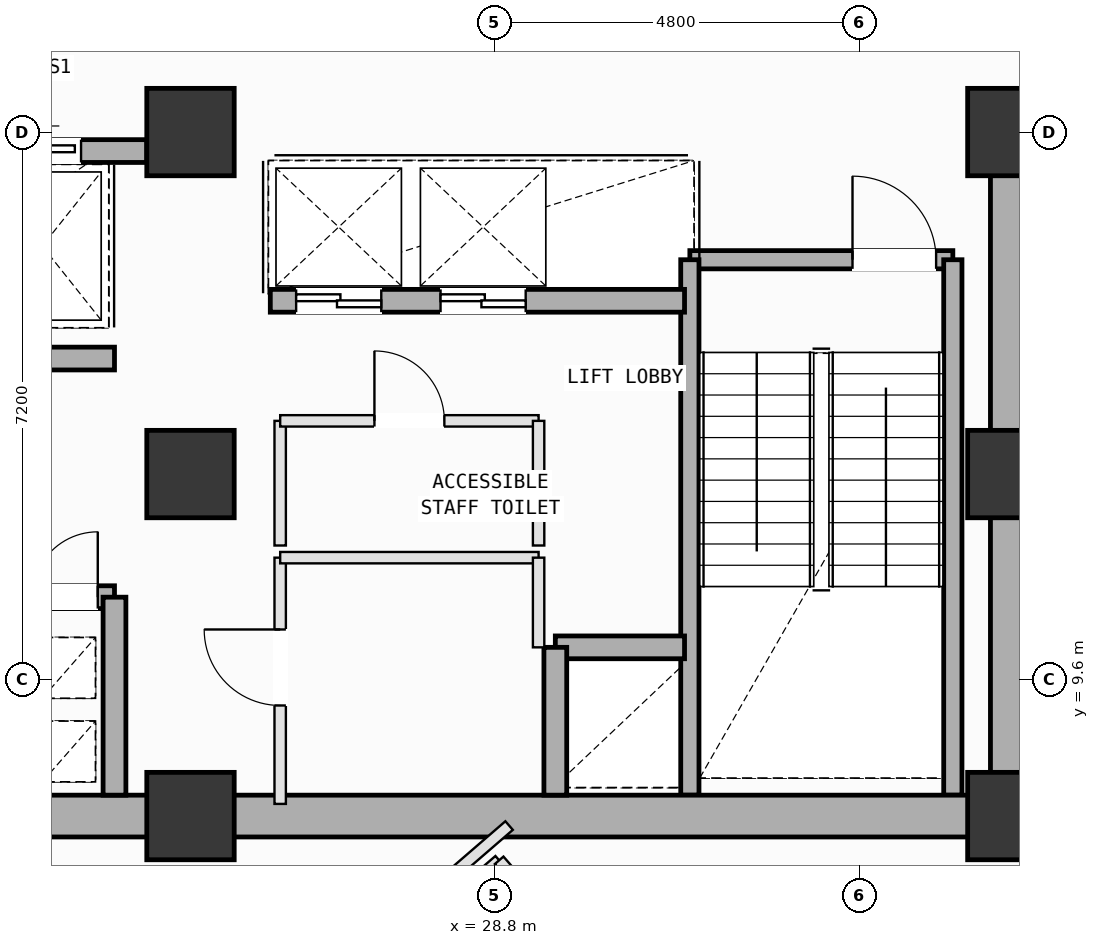
"""IFC4 building model, lengths in metres.
Left out: names, types, materials, properties, quantities, classifications, styles, units other than length and angle.
Written with IfcOpenShell. Run it as: python <this file> out.ifc"""

import sys

from ifc_helpers import new_model, si_unit, direction, frame, frame_2d, origin, origin_2d, place, context, subcontext, project, spatial, rectangle, extrude, element, fill, save


model = new_model("IFC4")
c1 = context("Model", 3, precision=1e-05, world=origin(), true_north=direction((0.0, 1.0)))
c2 = subcontext(c1, "Body", "Model", "MODEL_VIEW")
j1 = project(units=[si_unit("LENGTHUNIT", "METRE"), si_unit("PLANEANGLEUNIT", "RADIAN")], contexts=[c1])
p1 = place(None, origin())
s1 = spatial("IfcSite", under=j1, at=p1, CompositionType="ELEMENT")
p2 = place(p1, origin())
s2 = spatial("IfcBuilding", under=s1, at=p2, CompositionType="ELEMENT")
p3 = place(p2, frame((0.0, 0.0, 197.8)))
s3 = spatial("IfcBuildingStorey", under=s2, at=p3, CompositionType="ELEMENT", Elevation=197.8)
for number, where, z_axis, x_axis in (
    (1, (24.8, 7.8, 0.0), (0.0, 0.0, 1.0), (1.0, 0.0, 0.0)),
    (2, (24.8, 12.3, 0.0), (0.0, 0.0, 1.0), (1.0, 0.0, 0.0)),
    (3, (24.8, 16.8, 0.0), (0.0, 0.0, 1.0), (1.0, 0.0, 0.0)),
    (4, (35.6, 7.8, 0.0), (0.0, 0.0, 1.0), (1.0, 0.0, 0.0)),
    (5, (35.6, 12.3, 0.0), (0.0, 0.0, 1.0), (1.0, 0.0, 0.0)),
    (6, (35.6, 16.8, 0.0), (0.0, 0.0, 1.0), (1.0, 0.0, 0.0)),
):
    element("IfcColumn", number, at=place(p3, frame(where, z_axis=z_axis, x_axis=x_axis)), inside=s3, PredefinedType="COLUMN", context=c2, shape_type="SweptSolid", body=[
        extrude(rectangle(XDim=1.15, YDim=1.15, at=origin_2d()), origin(), (0.0, 0.0, 1.0), 4.0),
    ])
p4 = place(p3, frame((31.37, 15.12, 0.0), z_axis=(0.0, 0.0, 1.0), x_axis=(1.0, 0.0, 0.0)))
e7 = element("IfcWall", 7, at=p4, inside=s3, PredefinedType="SOLIDWALL", context=c2, shape_type="SweptSolid", body=[
    extrude(rectangle(XDim=3.46, YDim=0.24, at=frame_2d((1.73, 0.0))), origin(), (0.0, 0.0, 1.0), 3.78),
])
p5 = place(p4, frame((2.14, 0.0, 0.0)))
e8 = element("IfcOpeningElement", 8, at=p5, cuts=e7, PredefinedType="OPENING", context=c2, shape_type="SweptSolid", body=[
    extrude(rectangle(XDim=1.1, YDim=2.15, at=frame_2d((0.55, 1.075))), frame((0.0, 0.13, 0.0), z_axis=(0.0, -1.0, 0.0), x_axis=(1.0, 0.0, 0.0)), (0.0, 0.0, 1.0), 0.26),
])
for number, where, z_axis, x_axis in (
    (9, (34.83, 15.12, 0.0), (0.0, 0.0, 1.0), (0.0, -1.0, 0.0)),
    (10, (31.37, 8.075, 0.0), (0.0, 0.0, 1.0), (0.0, 1.0, 0.0)),
):
    element("IfcWall", number, at=place(p3, frame(where, z_axis=z_axis, x_axis=x_axis)), inside=s3, PredefinedType="SOLIDWALL", context=c2, shape_type="SweptSolid", body=[
        extrude(rectangle(XDim=7.045, YDim=0.24, at=frame_2d((3.522, 0.0))), origin(), (0.0, 0.0, 1.0), 3.78),
    ])
for number, where, z_axis, x_axis in (
    (11, (14.0, 7.8, 0.0), (0.0, 0.0, 1.0), (1.0, 0.0, 0.0)),
    (12, (24.8, 7.8, 0.0), (0.0, 0.0, 1.0), (1.0, 0.0, 0.0)),
):
    element("IfcWall", number, at=place(p3, frame(where, z_axis=z_axis, x_axis=x_axis)), inside=s3, PredefinedType="SHEAR", context=c2, shape_type="SweptSolid", body=[
        extrude(rectangle(XDim=10.8, YDim=0.55, at=frame_2d((5.4, 0.0))), origin(), (0.0, 0.0, 1.0), 3.78),
    ])
p6 = place(p3, frame((35.6, 7.8, 0.0), z_axis=(0.0, 0.0, 1.0), x_axis=(0.0, 1.0, 0.0)))
e13 = element("IfcWall", 13, at=p6, inside=s3, PredefinedType="SHEAR", context=c2, shape_type="SweptSolid", body=[
    extrude(rectangle(XDim=9.0, YDim=0.55, at=frame_2d((4.5, 0.0))), origin(), (0.0, 0.0, 1.0), 3.78),
])
p7 = place(p3, frame((19.85, 16.55, 0.0), z_axis=(0.0, 0.0, 1.0), x_axis=(1.0, 0.0, 0.0)))
e14 = element("IfcWall", 14, at=p7, inside=s3, PredefinedType="SOLIDWALL", context=c2, shape_type="SweptSolid", body=[
    extrude(rectangle(XDim=4.375, YDim=0.3, at=frame_2d((2.188, 0.0))), origin(), (0.0, 0.0, 1.0), 3.78),
])
p8 = place(p7, frame((0.475, 0.0, 0.0)))
e15 = element("IfcOpeningElement", 15, at=p8, cuts=e14, PredefinedType="OPENING", context=c2, shape_type="SweptSolid", body=[
    extrude(rectangle(XDim=1.25, YDim=2.18, at=frame_2d((0.625, 1.09))), frame((0.0, 0.16, 0.0), z_axis=(0.0, -1.0, 0.0), x_axis=(1.0, 0.0, 0.0)), (0.0, 0.0, 1.0), 0.32),
])
p9 = place(p7, frame((2.49, 0.0, 0.0)))
e16 = element("IfcOpeningElement", 16, at=p9, cuts=e14, PredefinedType="OPENING", context=c2, shape_type="SweptSolid", body=[
    extrude(rectangle(XDim=1.02, YDim=2.12, at=frame_2d((0.51, 1.06))), frame((0.0, 0.16, 0.0), z_axis=(0.0, -1.0, 0.0), x_axis=(1.0, 0.0, 0.0)), (0.0, 0.0, 1.0), 0.32),
])
p10 = place(p3, frame((18.5, 10.68, 0.0), z_axis=(0.0, 0.0, 1.0), x_axis=(1.0, 0.0, 0.0)))
e17 = element("IfcWall", 17, at=p10, inside=s3, PredefinedType="SOLIDWALL", context=c2, shape_type="SweptSolid", body=[
    extrude(rectangle(XDim=5.3, YDim=0.3, at=frame_2d((2.65, 0.0))), origin(), (0.0, 0.0, 1.0), 3.78),
])
p11 = place(p10, frame((4.22, 0.0, 0.0)))
e18 = element("IfcOpeningElement", 18, at=p11, cuts=e17, PredefinedType="OPENING", context=c2, shape_type="SweptSolid", body=[
    extrude(rectangle(XDim=0.86, YDim=2.06, at=frame_2d((0.43, 1.03))), frame((0.0, 0.16, 0.0), z_axis=(0.0, -1.0, 0.0), x_axis=(1.0, 0.0, 0.0)), (0.0, 0.0, 1.0), 0.32),
])
p12 = place(p10, frame((0.425, 0.0, 0.0)))
e19 = element("IfcOpeningElement", 19, at=p12, cuts=e17, PredefinedType="OPENING", context=c2, shape_type="SweptSolid", body=[
    extrude(rectangle(XDim=1.25, YDim=2.18, at=frame_2d((0.625, 1.09))), frame((0.0, 0.16, 0.0), z_axis=(0.0, -1.0, 0.0), x_axis=(1.0, 0.0, 0.0)), (0.0, 0.0, 1.0), 0.32),
])
p13 = place(p10, frame((2.525, 0.0, 0.0)))
e20 = element("IfcOpeningElement", 20, at=p13, cuts=e17, PredefinedType="OPENING", context=c2, shape_type="SweptSolid", body=[
    extrude(rectangle(XDim=1.25, YDim=2.18, at=frame_2d((0.625, 1.09))), frame((0.0, 0.16, 0.0), z_axis=(0.0, -1.0, 0.0), x_axis=(1.0, 0.0, 0.0)), (0.0, 0.0, 1.0), 0.32),
])
p14 = place(p3, frame((18.5, 13.82, 0.0), z_axis=(0.0, 0.0, 1.0), x_axis=(1.0, 0.0, 0.0)))
e21 = element("IfcWall", 21, at=p14, inside=s3, PredefinedType="SOLIDWALL", context=c2, shape_type="SweptSolid", body=[
    extrude(rectangle(XDim=5.3, YDim=0.3, at=frame_2d((2.65, 0.0))), origin(), (0.0, 0.0, 1.0), 3.78),
])
p15 = place(p14, frame((0.18, 0.0, 0.0)))
e22 = element("IfcOpeningElement", 22, at=p15, cuts=e21, PredefinedType="OPENING", context=c2, shape_type="SweptSolid", body=[
    extrude(rectangle(XDim=1.1, YDim=2.15, at=frame_2d((0.55, 1.075))), frame((0.0, 0.16, 0.0), z_axis=(0.0, -1.0, 0.0), x_axis=(1.0, 0.0, 0.0)), (0.0, 0.0, 1.0), 0.32),
])
p16 = place(p3, frame((23.8, 8.075, 0.0), z_axis=(0.0, 0.0, 1.0), x_axis=(0.0, 1.0, 0.0)))
e23 = element("IfcWall", 23, at=p16, inside=s3, PredefinedType="SOLIDWALL", context=c2, shape_type="SweptSolid", body=[
    extrude(rectangle(XDim=2.605, YDim=0.3, at=frame_2d((1.302, 0.0))), origin(), (0.0, 0.0, 1.0), 3.78),
])
p17 = place(p3, frame((29.6, 10.02, 0.0), z_axis=(0.0, 0.0, 1.0), x_axis=(1.0, 0.0, 0.0)))
e24 = element("IfcWall", 24, at=p17, inside=s3, PredefinedType="SOLIDWALL", context=c2, shape_type="SweptSolid", body=[
    extrude(rectangle(XDim=1.7, YDim=0.3, at=frame_2d((0.85, 0.0))), origin(), (0.0, 0.0, 1.0), 3.78),
])
p18 = place(p3, frame((29.6, 8.075, 0.0), z_axis=(0.0, 0.0, 1.0), x_axis=(0.0, 1.0, 0.0)))
e25 = element("IfcWall", 25, at=p18, inside=s3, PredefinedType="SOLIDWALL", context=c2, shape_type="SweptSolid", body=[
    extrude(rectangle(XDim=1.945, YDim=0.3, at=frame_2d((0.973, 0.0))), origin(), (0.0, 0.0, 1.0), 3.78),
])
p19 = place(p3, frame((25.85, 14.58, 0.0), z_axis=(0.0, 0.0, 1.0), x_axis=(1.0, 0.0, 0.0)))
e26 = element("IfcWall", 26, at=p19, inside=s3, PredefinedType="SOLIDWALL", context=c2, shape_type="SweptSolid", body=[
    extrude(rectangle(XDim=5.45, YDim=0.3, at=frame_2d((2.725, 0.0))), origin(), (0.0, 0.0, 1.0), 3.78),
])
p20 = place(p19, frame((0.34, 0.0, 0.0)))
e27 = element("IfcOpeningElement", 27, at=p20, cuts=e26, PredefinedType="OPENING", context=c2, shape_type="SweptSolid", body=[
    extrude(rectangle(XDim=1.12, YDim=2.15, at=frame_2d((0.56, 1.075))), frame((0.0, 0.16, 0.0), z_axis=(0.0, -1.0, 0.0), x_axis=(1.0, 0.0, 0.0)), (0.0, 0.0, 1.0), 0.32),
])
p21 = place(p19, frame((2.24, 0.0, 0.0)))
e28 = element("IfcOpeningElement", 28, at=p21, cuts=e26, PredefinedType="OPENING", context=c2, shape_type="SweptSolid", body=[
    extrude(rectangle(XDim=1.12, YDim=2.15, at=frame_2d((0.56, 1.075))), frame((0.0, 0.16, 0.0), z_axis=(0.0, -1.0, 0.0), x_axis=(1.0, 0.0, 0.0)), (0.0, 0.0, 1.0), 0.32),
])
p22 = place(p3, frame((25.98, 7.96, 0.0), z_axis=(0.0, 0.0, 1.0), x_axis=(0.0, 1.0, 0.0)))
e29 = element("IfcWall", 29, at=p22, inside=s3, PredefinedType="PARTITIONING", context=c2, shape_type="SweptSolid", body=[
    extrude(rectangle(XDim=3.24, YDim=0.15, at=frame_2d((1.62, 0.0))), origin(), (0.0, 0.0, 1.0), 3.78),
])
p23 = place(p22, frame((1.295, 0.0, 0.0)))
e30 = element("IfcOpeningElement", 30, at=p23, cuts=e29, PredefinedType="OPENING", context=c2, shape_type="SweptSolid", body=[
    extrude(rectangle(XDim=1.0, YDim=2.12, at=frame_2d((0.5, 1.06))), frame((0.0, 0.085, 0.0), z_axis=(0.0, -1.0, 0.0), x_axis=(1.0, 0.0, 0.0)), (0.0, 0.0, 1.0), 0.17),
])
p24 = place(p3, frame((25.98, 11.2, 0.0), z_axis=(0.0, 0.0, 1.0), x_axis=(1.0, 0.0, 0.0)))
e31 = element("IfcWall", 31, at=p24, inside=s3, PredefinedType="PARTITIONING", context=c2, shape_type="SweptSolid", body=[
    extrude(rectangle(XDim=3.4, YDim=0.15, at=frame_2d((1.7, 0.0))), origin(), (0.0, 0.0, 1.0), 3.78),
])
p25 = place(p3, frame((29.38, 11.2, 0.0), z_axis=(0.0, 0.0, 1.0), x_axis=(0.0, -1.0, 0.0)))
e32 = element("IfcWall", 32, at=p25, inside=s3, PredefinedType="PARTITIONING", context=c2, shape_type="SweptSolid", body=[
    extrude(rectangle(XDim=1.18, YDim=0.15, at=frame_2d((0.59, 0.0))), origin(), (0.0, 0.0, 1.0), 3.78),
])
p26 = place(p3, frame((25.98, 11.36, 0.0), z_axis=(0.0, 0.0, 1.0), x_axis=(0.0, 1.0, 0.0)))
e33 = element("IfcWall", 33, at=p26, inside=s3, PredefinedType="PARTITIONING", context=c2, shape_type="SweptSolid", body=[
    extrude(rectangle(XDim=1.64, YDim=0.15, at=frame_2d((0.82, 0.0))), origin(), (0.0, 0.0, 1.0), 3.78),
])
p27 = place(p3, frame((25.98, 13.0, 0.0), z_axis=(0.0, 0.0, 1.0), x_axis=(1.0, 0.0, 0.0)))
e34 = element("IfcWall", 34, at=p27, inside=s3, PredefinedType="PARTITIONING", context=c2, shape_type="SweptSolid", body=[
    extrude(rectangle(XDim=3.4, YDim=0.15, at=frame_2d((1.7, 0.0))), origin(), (0.0, 0.0, 1.0), 3.78),
])
p28 = place(p27, frame((1.24, 0.0, 0.0)))
e35 = element("IfcOpeningElement", 35, at=p28, cuts=e34, PredefinedType="OPENING", context=c2, shape_type="SweptSolid", body=[
    extrude(rectangle(XDim=0.92, YDim=2.1, at=frame_2d((0.46, 1.05))), frame((0.0, 0.085, 0.0), z_axis=(0.0, -1.0, 0.0), x_axis=(1.0, 0.0, 0.0)), (0.0, 0.0, 1.0), 0.17),
])
p29 = place(p3, frame((29.38, 13.0, 0.0), z_axis=(0.0, 0.0, 1.0), x_axis=(0.0, -1.0, 0.0)))
e36 = element("IfcWall", 36, at=p29, inside=s3, PredefinedType="PARTITIONING", context=c2, shape_type="SweptSolid", body=[
    extrude(rectangle(XDim=1.64, YDim=0.15, at=frame_2d((0.82, 0.0))), origin(), (0.0, 0.0, 1.0), 3.78),
])
p30 = place(p3, frame((19.602, -0.788, 0.0), z_axis=(0.0, 0.0, 1.0), x_axis=(0.756432248101, 0.654072055688, 0.0)))
e37 = element("IfcWall", 37, at=p30, inside=s3, PredefinedType="PARTITIONING", context=c2, shape_type="SweptSolid", body=[
    extrude(rectangle(XDim=12.24, YDim=0.15, at=frame_2d((6.12, 0.0))), origin(), (0.0, 0.0, 1.0), 3.78),
])
p31 = place(p3, frame((28.861, 7.218, 0.0), z_axis=(0.0, 0.0, 1.0), x_axis=(0.654048499955, -0.756452615639, 0.0)))
e38 = element("IfcWall", 38, at=p31, inside=s3, PredefinedType="PARTITIONING", context=c2, shape_type="SweptSolid", body=[
    extrude(rectangle(XDim=11.935, YDim=0.15, at=frame_2d((5.967, 0.0))), origin(), (0.0, 0.0, 1.0), 3.78),
])
p32 = place(p31, frame((5.537, 0.0, 0.0)))
e39 = element("IfcOpeningElement", 39, at=p32, cuts=e38, PredefinedType="OPENING", context=c2, shape_type="SweptSolid", body=[
    extrude(rectangle(XDim=0.86, YDim=2.06, at=frame_2d((0.43, 1.03))), frame((0.0, 0.085, 0.0), z_axis=(0.0, -1.0, 0.0), x_axis=(1.0, 0.0, 0.0)), (0.0, 0.0, 1.0), 0.17),
])
p33 = place(p3, frame((35.6, 7.5, 0.0), z_axis=(0.0, 0.0, 1.0), x_axis=(1.0, 0.0, 0.0)))
e40 = element("IfcWall", 40, at=p33, inside=s3, PredefinedType="PARTITIONING", context=c2, shape_type="SweptSolid", body=[
    extrude(rectangle(XDim=0.55, YDim=0.15, at=frame_2d((0.275, 0.0))), origin(), (0.0, 0.0, 1.0), 3.78),
])
p34 = place(p3, frame((28.992, 7.675, 0.0), z_axis=(0.0, 0.0, 1.0), x_axis=(-0.756407052187, -0.654101193549, 0.0)))
e41 = element("IfcWall", 41, at=p34, inside=s3, PredefinedType="PARTITIONING", context=c2, shape_type="SweptSolid", body=[
    extrude(rectangle(XDim=12.648, YDim=0.15, at=frame_2d((6.324, 0.0))), origin(), (0.0, 0.0, 1.0), 3.78),
])
p35 = place(p5, origin())
e42 = element("IfcDoor", 42, at=p35, inside=s3, OperationType="SINGLE_SWING_LEFT", PredefinedType="DOOR", context=c2, shape_type="SweptSolid", body=[
    extrude(rectangle(XDim=1.1, YDim=2.15, at=frame_2d((0.55, 1.075))), frame((0.0, 0.025, 0.0), z_axis=(0.0, -1.0, 0.0), x_axis=(1.0, 0.0, 0.0)), (0.0, 0.0, 1.0), 0.05),
])
fill(e8, e42)
p36 = place(p11, origin())
e43 = element("IfcDoor", 43, at=p36, inside=s3, OperationType="SINGLE_SWING_RIGHT", PredefinedType="DOOR", context=c2, shape_type="SweptSolid", body=[
    extrude(rectangle(XDim=0.86, YDim=2.06, at=frame_2d((0.43, 1.03))), frame((0.0, 0.025, 0.0), z_axis=(0.0, -1.0, 0.0), x_axis=(1.0, 0.0, 0.0)), (0.0, 0.0, 1.0), 0.05),
])
fill(e18, e43)
p37 = place(p20, origin())
e44 = element("IfcDoor", 44, at=p37, inside=s3, OperationType="DOUBLE_DOOR_SLIDING", PredefinedType="DOOR", context=c2, shape_type="SweptSolid", body=[
    extrude(rectangle(XDim=1.12, YDim=2.15, at=frame_2d((0.56, 1.075))), frame((0.0, 0.025, 0.0), z_axis=(0.0, -1.0, 0.0), x_axis=(1.0, 0.0, 0.0)), (0.0, 0.0, 1.0), 0.05),
])
fill(e27, e44)
p38 = place(p21, origin())
e45 = element("IfcDoor", 45, at=p38, inside=s3, OperationType="DOUBLE_DOOR_SLIDING", PredefinedType="DOOR", context=c2, shape_type="SweptSolid", body=[
    extrude(rectangle(XDim=1.12, YDim=2.15, at=frame_2d((0.56, 1.075))), frame((0.0, 0.025, 0.0), z_axis=(0.0, -1.0, 0.0), x_axis=(1.0, 0.0, 0.0)), (0.0, 0.0, 1.0), 0.05),
])
fill(e28, e45)
p39 = place(p9, origin())
e46 = element("IfcDoor", 46, at=p39, inside=s3, OperationType="SLIDING_TO_LEFT", PredefinedType="DOOR", context=c2, shape_type="SweptSolid", body=[
    extrude(rectangle(XDim=1.02, YDim=2.12, at=frame_2d((0.51, 1.06))), frame((0.0, 0.025, 0.0), z_axis=(0.0, -1.0, 0.0), x_axis=(1.0, 0.0, 0.0)), (0.0, 0.0, 1.0), 0.05),
])
fill(e16, e46)
p40 = place(p23, origin())
e47 = element("IfcDoor", 47, at=p40, inside=s3, OperationType="SINGLE_SWING_RIGHT", PredefinedType="DOOR", context=c2, shape_type="SweptSolid", body=[
    extrude(rectangle(XDim=1.0, YDim=2.12, at=frame_2d((0.5, 1.06))), frame((0.0, 0.025, 0.0), z_axis=(0.0, -1.0, 0.0), x_axis=(1.0, 0.0, 0.0)), (0.0, 0.0, 1.0), 0.05),
])
fill(e30, e47)
p41 = place(p28, origin())
e48 = element("IfcDoor", 48, at=p41, inside=s3, OperationType="SINGLE_SWING_LEFT", PredefinedType="DOOR", context=c2, shape_type="SweptSolid", body=[
    extrude(rectangle(XDim=0.92, YDim=2.1, at=frame_2d((0.46, 1.05))), frame((0.0, 0.025, 0.0), z_axis=(0.0, -1.0, 0.0), x_axis=(1.0, 0.0, 0.0)), (0.0, 0.0, 1.0), 0.05),
])
fill(e35, e48)
save(model, sys.argv[1])
